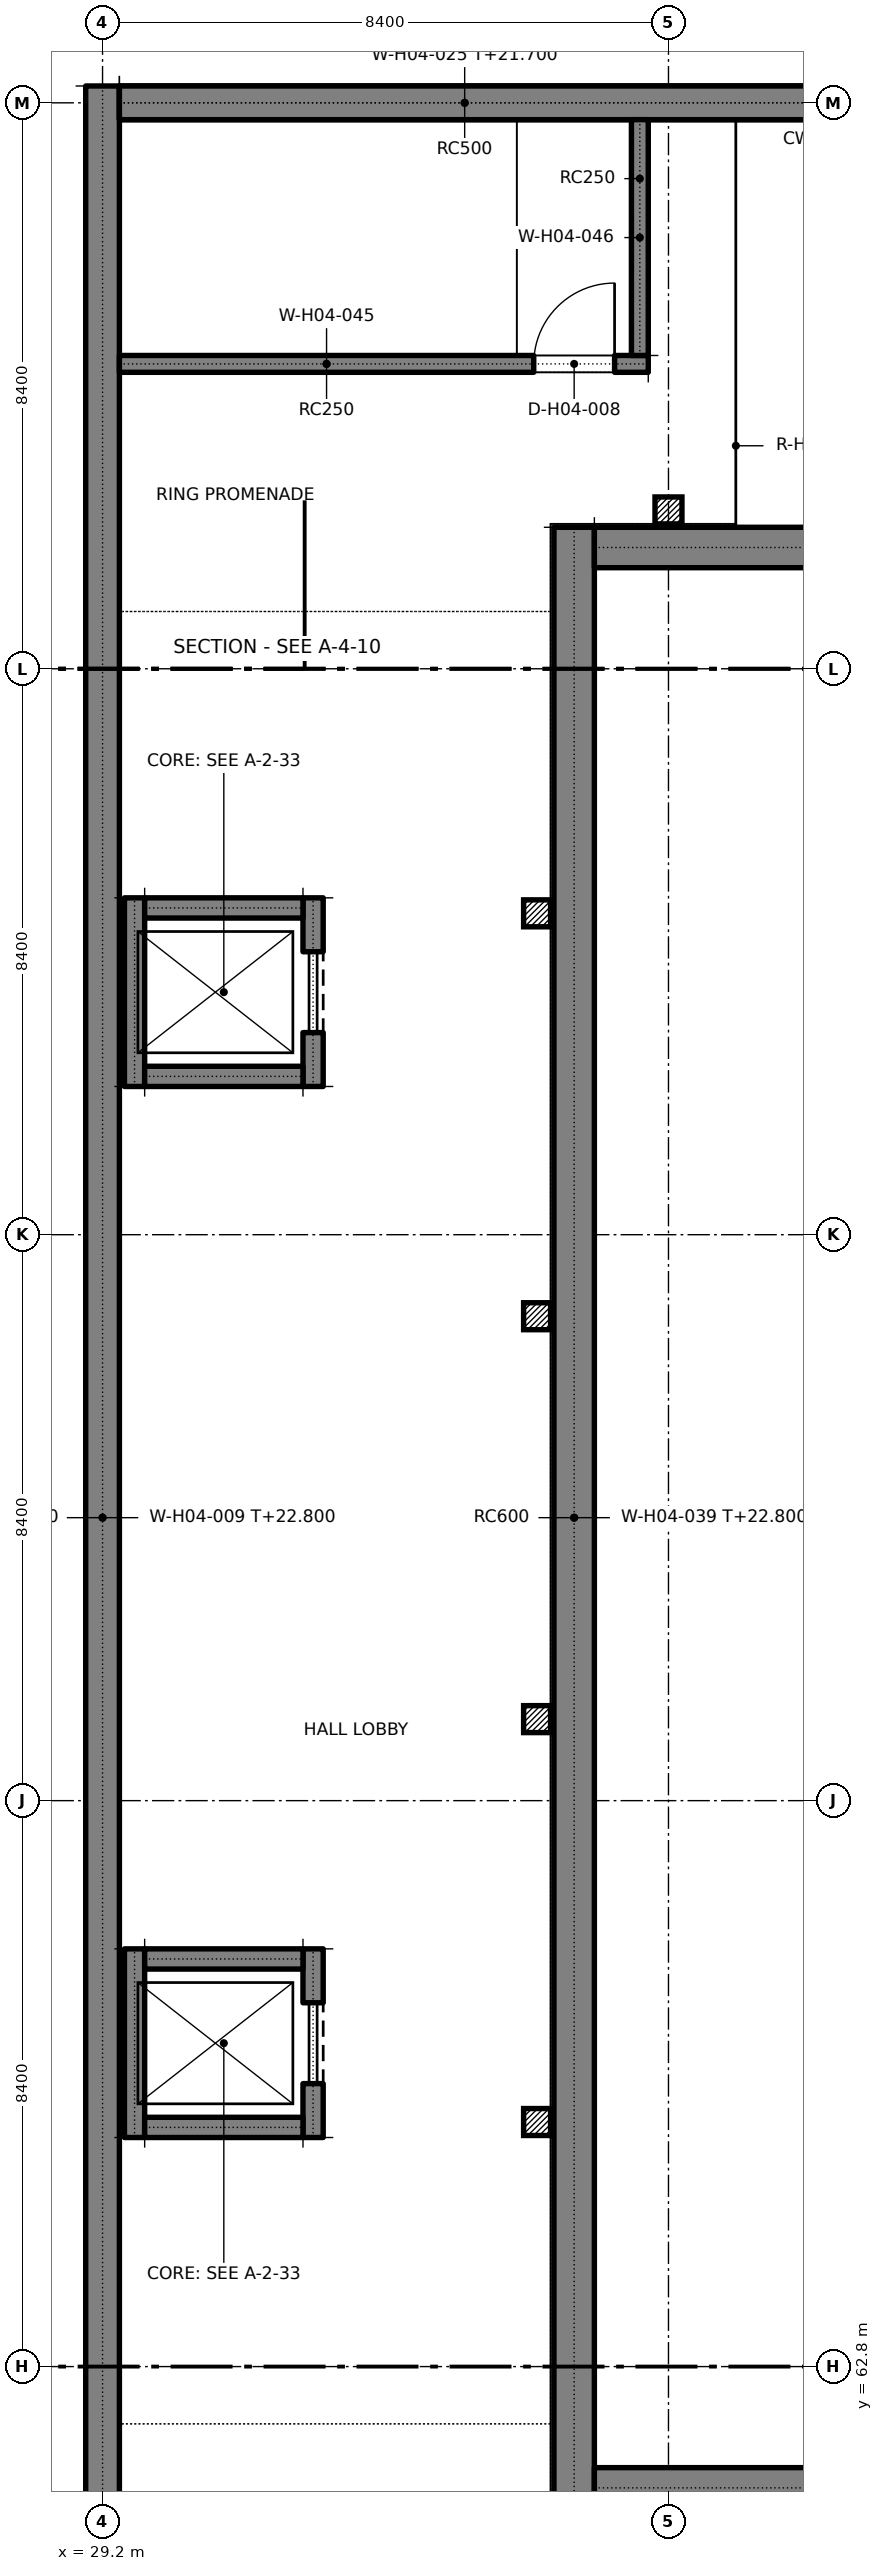
"""IFC4 building model, lengths in metres.
Left out: names, types, materials, properties, quantities, classifications, styles, units other than length and angle.
Written with IfcOpenShell. Run it as: python <this file> out.ifc"""

import sys

from ifc_helpers import new_model, si_unit, direction, frame, frame_2d, origin, origin_2d, place, context, subcontext, project, spatial, rectangle, extrude, element, fill, save


model = new_model("IFC4")
c1 = context("Model", 3, precision=1e-05, world=origin(), true_north=direction((0.0, 1.0)))
c2 = subcontext(c1, "Body", "Model", "MODEL_VIEW")
j1 = project(units=[si_unit("LENGTHUNIT", "METRE"), si_unit("PLANEANGLEUNIT", "RADIAN")], contexts=[c1])
p1 = place(None, origin())
s1 = spatial("IfcSite", under=j1, at=p1, CompositionType="ELEMENT")
p2 = place(p1, origin())
s2 = spatial("IfcBuilding", under=s1, at=p2, CompositionType="ELEMENT")
p3 = place(p2, frame((0.0, 0.0, 19.2)))
s3 = spatial("IfcBuildingStorey", under=s2, at=p3, CompositionType="ELEMENT", Elevation=19.2)
p4 = place(p3, frame((29.675, 66.2, 0.0), z_axis=(0.0, 0.0, 1.0), x_axis=(0.0, 1.0, 0.0)))
e1 = element("IfcWall", 1, at=p4, inside=s3, PredefinedType="SOLIDWALL", context=c2, shape_type="SweptSolid", body=[
    extrude(rectangle(XDim=2.8, YDim=0.3, at=frame_2d((1.4, 0.0))), origin(), (0.0, 0.0, 1.0), 4.1),
])
p5 = place(p3, frame((32.325, 66.2, 0.0), z_axis=(0.0, 0.0, 1.0), x_axis=(0.0, 1.0, 0.0)))
e2 = element("IfcWall", 2, at=p5, inside=s3, PredefinedType="SOLIDWALL", context=c2, shape_type="SweptSolid", body=[
    extrude(rectangle(XDim=2.8, YDim=0.3, at=frame_2d((1.4, 0.0))), origin(), (0.0, 0.0, 1.0), 4.1),
])
p6 = place(p5, frame((0.8, 0.0, 0.0)))
e3 = element("IfcOpeningElement", 3, at=p6, cuts=e2, PredefinedType="OPENING", context=c2, shape_type="SweptSolid", body=[
    extrude(rectangle(XDim=1.2, YDim=2.1, at=frame_2d((0.6, 1.05))), frame((0.0, 0.16, 0.0), z_axis=(0.0, -1.0, 0.0), x_axis=(1.0, 0.0, 0.0)), (0.0, 0.0, 1.0), 0.32),
])
for number, where, z_axis, x_axis in (
    (4, (29.825, 66.35, 0.0), (0.0, 0.0, 1.0), (1.0, 0.0, 0.0)),
    (5, (29.825, 68.85, 0.0), (0.0, 0.0, 1.0), (1.0, 0.0, 0.0)),
):
    element("IfcWall", number, at=place(p3, frame(where, z_axis=z_axis, x_axis=x_axis)), inside=s3, PredefinedType="SOLIDWALL", context=c2, shape_type="SweptSolid", body=[
        extrude(rectangle(XDim=2.35, YDim=0.3, at=frame_2d((1.175, 0.0))), origin(), (0.0, 0.0, 1.0), 4.1),
    ])
p7 = place(p3, frame((29.675, 81.8, 0.0), z_axis=(0.0, 0.0, 1.0), x_axis=(0.0, 1.0, 0.0)))
e6 = element("IfcWall", 6, at=p7, inside=s3, PredefinedType="SOLIDWALL", context=c2, shape_type="SweptSolid", body=[
    extrude(rectangle(XDim=2.8, YDim=0.3, at=frame_2d((1.4, 0.0))), origin(), (0.0, 0.0, 1.0), 4.1),
])
p8 = place(p3, frame((32.325, 81.8, 0.0), z_axis=(0.0, 0.0, 1.0), x_axis=(0.0, 1.0, 0.0)))
e7 = element("IfcWall", 7, at=p8, inside=s3, PredefinedType="SOLIDWALL", context=c2, shape_type="SweptSolid", body=[
    extrude(rectangle(XDim=2.8, YDim=0.3, at=frame_2d((1.4, 0.0))), origin(), (0.0, 0.0, 1.0), 4.1),
])
p9 = place(p8, frame((0.8, 0.0, 0.0)))
e8 = element("IfcOpeningElement", 8, at=p9, cuts=e7, PredefinedType="OPENING", context=c2, shape_type="SweptSolid", body=[
    extrude(rectangle(XDim=1.2, YDim=2.1, at=frame_2d((0.6, 1.05))), frame((0.0, 0.16, 0.0), z_axis=(0.0, -1.0, 0.0), x_axis=(1.0, 0.0, 0.0)), (0.0, 0.0, 1.0), 0.32),
])
for number, where, z_axis, x_axis in (
    (9, (29.825, 81.95, 0.0), (0.0, 0.0, 1.0), (1.0, 0.0, 0.0)),
    (10, (29.825, 84.45, 0.0), (0.0, 0.0, 1.0), (1.0, 0.0, 0.0)),
):
    element("IfcWall", number, at=place(p3, frame(where, z_axis=z_axis, x_axis=x_axis)), inside=s3, PredefinedType="SOLIDWALL", context=c2, shape_type="SweptSolid", body=[
        extrude(rectangle(XDim=2.35, YDim=0.3, at=frame_2d((1.175, 0.0))), origin(), (0.0, 0.0, 1.0), 4.1),
    ])
p10 = place(p3, frame((29.2, 54.15, 0.0), z_axis=(0.0, 0.0, 1.0), x_axis=(0.0, 1.0, 0.0)))
e11 = element("IfcWall", 11, at=p10, inside=s3, PredefinedType="SOLIDWALL", context=c2, shape_type="SweptSolid", body=[
    extrude(rectangle(XDim=42.5, YDim=0.5, at=frame_2d((21.25, 0.0))), origin(), (0.0, 0.0, 1.0), 3.6),
])
p11 = place(p3, frame((29.45, 96.4, 0.0), z_axis=(0.0, 0.0, 1.0), x_axis=(1.0, 0.0, 0.0)))
e12 = element("IfcWall", 12, at=p11, inside=s3, PredefinedType="SOLIDWALL", context=c2, shape_type="SweptSolid", body=[
    extrude(rectangle(XDim=10.25, YDim=0.5, at=frame_2d((5.125, 0.0))), origin(), (0.0, 0.0, 1.0), 2.5),
])
p12 = place(p3, frame((29.45, 96.4, 2.5), z_axis=(0.0, 0.0, 1.0), x_axis=(1.0, 0.0, 0.0)))
e13 = element("IfcWall", 13, at=p12, inside=s3, PredefinedType="SOLIDWALL", context=c2, shape_type="SweptSolid", body=[
    extrude(rectangle(XDim=66.7, YDim=0.5, at=frame_2d((33.35, 0.0))), origin(), (0.0, 0.0, 1.0), 1.1),
])
p13 = place(p3, frame((36.2, 60.7, 0.0), z_axis=(0.0, 0.0, 1.0), x_axis=(0.0, 1.0, 0.0)))
e14 = element("IfcWall", 14, at=p13, inside=s3, PredefinedType="SOLIDWALL", context=c2, shape_type="SweptSolid", body=[
    extrude(rectangle(XDim=29.4, YDim=0.6, at=frame_2d((14.7, 0.0))), origin(), (0.0, 0.0, 1.0), 3.6),
])
for number, where, z_axis, x_axis in (
    (15, (36.5, 61.0, 0.0), (0.0, 0.0, 1.0), (1.0, 0.0, 0.0)),
    (16, (36.5, 89.8, 0.0), (0.0, 0.0, 1.0), (1.0, 0.0, 0.0)),
):
    element("IfcWall", number, at=place(p3, frame(where, z_axis=z_axis, x_axis=x_axis)), inside=s3, PredefinedType="SOLIDWALL", context=c2, shape_type="SweptSolid", body=[
        extrude(rectangle(XDim=52.6, YDim=0.6, at=frame_2d((26.3, 0.0))), origin(), (0.0, 0.0, 1.0), 3.6),
    ])
p14 = place(p3, frame((29.45, 92.525, 0.0), z_axis=(0.0, 0.0, 1.0), x_axis=(1.0, 0.0, 0.0)))
e17 = element("IfcWall", 17, at=p14, inside=s3, PredefinedType="SOLIDWALL", context=c2, shape_type="SweptSolid", body=[
    extrude(rectangle(XDim=7.85, YDim=0.25, at=frame_2d((3.925, 0.0))), origin(), (0.0, 0.0, 1.0), 3.35),
])
p15 = place(p14, frame((6.15, 0.0, 0.0)))
e18 = element("IfcOpeningElement", 18, at=p15, cuts=e17, PredefinedType="OPENING", context=c2, shape_type="SweptSolid", body=[
    extrude(rectangle(XDim=1.2, YDim=2.1, at=frame_2d((0.6, 1.05))), frame((0.0, 0.135, 0.0), z_axis=(0.0, -1.0, 0.0), x_axis=(1.0, 0.0, 0.0)), (0.0, 0.0, 1.0), 0.27),
])
p16 = place(p3, frame((37.175, 92.65, 0.0), z_axis=(0.0, 0.0, 1.0), x_axis=(0.0, 1.0, 0.0)))
e19 = element("IfcWall", 19, at=p16, inside=s3, PredefinedType="SOLIDWALL", context=c2, shape_type="SweptSolid", body=[
    extrude(rectangle(XDim=3.5, YDim=0.25, at=frame_2d((1.75, 0.0))), origin(), (0.0, 0.0, 1.0), 3.35),
])
for number, where, z_axis, x_axis in (
    (20, (37.6, 90.35, 0.0), (0.0, 0.0, 1.0), (1.0, 0.0, 0.0)),
    (21, (35.65, 66.43, 0.0), (0.0, 0.0, 1.0), (1.0, 0.0, 0.0)),
    (22, (35.65, 72.41, 0.0), (0.0, 0.0, 1.0), (1.0, 0.0, 0.0)),
    (23, (35.65, 78.39, 0.0), (0.0, 0.0, 1.0), (1.0, 0.0, 0.0)),
    (24, (35.65, 84.37, 0.0), (0.0, 0.0, 1.0), (1.0, 0.0, 0.0)),
):
    element("IfcColumn", number, at=place(p3, frame(where, z_axis=z_axis, x_axis=x_axis)), inside=s3, PredefinedType="COLUMN", context=c2, shape_type="SweptSolid", body=[
        extrude(rectangle(XDim=0.4, YDim=0.4, at=origin_2d()), origin(), (0.0, 0.0, 1.0), 3.6),
    ])
p17 = place(p6, origin())
e25 = element("IfcDoor", 25, at=p17, inside=s3, OperationType="SLIDING_TO_LEFT", PredefinedType="DOOR", context=c2, shape_type="SweptSolid", body=[
    extrude(rectangle(XDim=1.2, YDim=2.1, at=frame_2d((0.6, 1.05))), frame((0.0, 0.025, 0.0), z_axis=(0.0, -1.0, 0.0), x_axis=(1.0, 0.0, 0.0)), (0.0, 0.0, 1.0), 0.05),
])
fill(e3, e25)
p18 = place(p9, origin())
e26 = element("IfcDoor", 26, at=p18, inside=s3, OperationType="SLIDING_TO_LEFT", PredefinedType="DOOR", context=c2, shape_type="SweptSolid", body=[
    extrude(rectangle(XDim=1.2, YDim=2.1, at=frame_2d((0.6, 1.05))), frame((0.0, 0.025, 0.0), z_axis=(0.0, -1.0, 0.0), x_axis=(1.0, 0.0, 0.0)), (0.0, 0.0, 1.0), 0.05),
])
fill(e8, e26)
p19 = place(p15, origin())
e27 = element("IfcDoor", 27, at=p19, inside=s3, OperationType="SINGLE_SWING_RIGHT", PredefinedType="DOOR", context=c2, shape_type="SweptSolid", body=[
    extrude(rectangle(XDim=1.2, YDim=2.1, at=frame_2d((0.6, 1.05))), frame((0.0, 0.025, 0.0), z_axis=(0.0, -1.0, 0.0), x_axis=(1.0, 0.0, 0.0)), (0.0, 0.0, 1.0), 0.05),
])
fill(e18, e27)
save(model, sys.argv[1])
